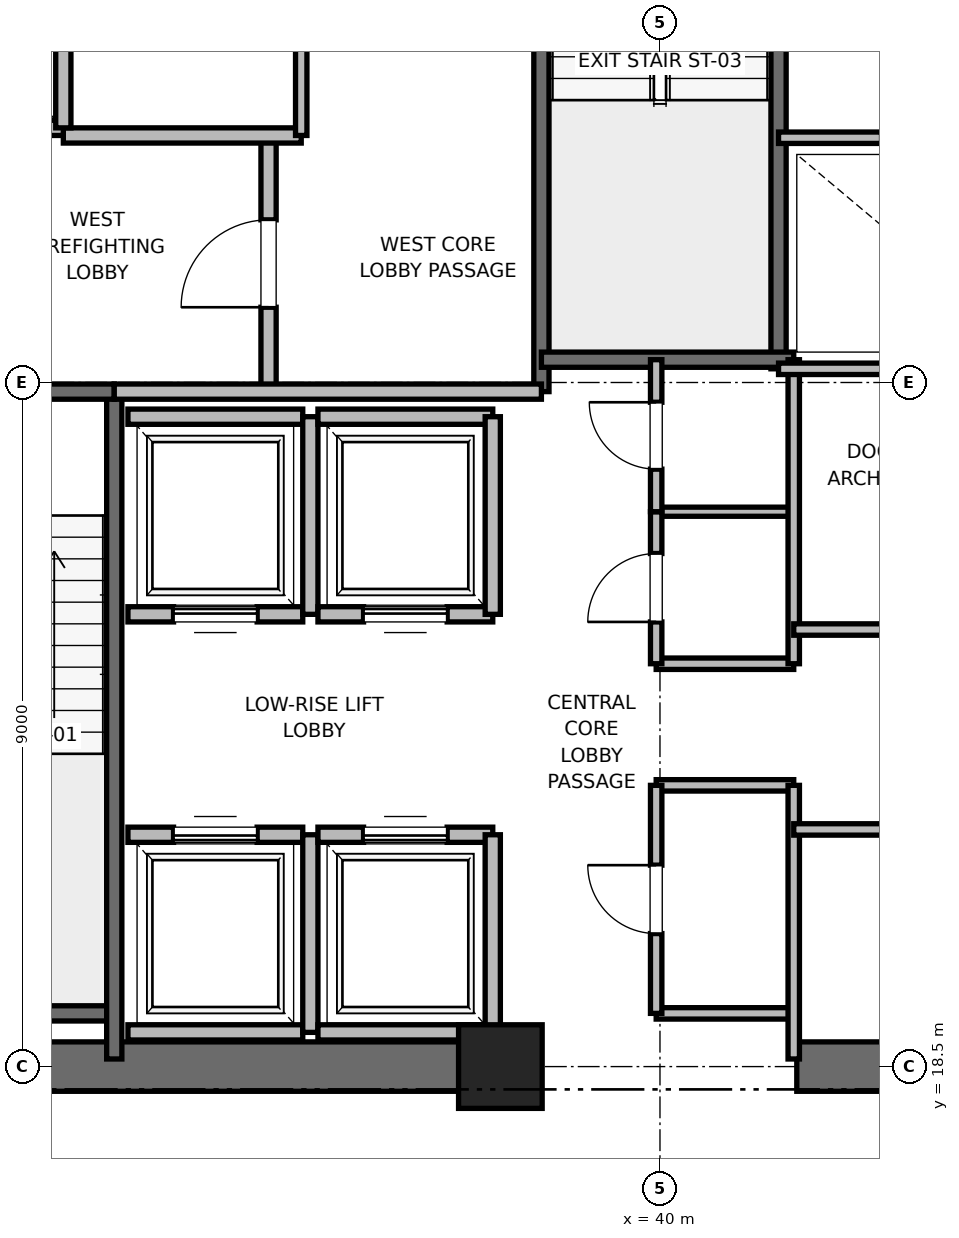
"""IFC4 building model, lengths in metres.
Left out: names, types, materials, properties, quantities, classifications, styles, units other than length and angle.
Written with IfcOpenShell. Run it as: python <this file> out.ifc"""

import sys

from ifc_helpers import new_model, si_unit, direction, frame, frame_2d, origin, origin_2d, place, context, subcontext, project, spatial, rectangle, extrude, element, fill, save


model = new_model("IFC4")
c1 = context("Model", 3, precision=1e-05, world=origin(), true_north=direction((0.0, 1.0)))
c2 = subcontext(c1, "Body", "Model", "MODEL_VIEW")
j1 = project(units=[si_unit("LENGTHUNIT", "METRE"), si_unit("PLANEANGLEUNIT", "RADIAN")], contexts=[c1])
p1 = place(None, origin())
s1 = spatial("IfcSite", under=j1, at=p1, CompositionType="ELEMENT")
p2 = place(p1, origin())
s2 = spatial("IfcBuilding", under=s1, at=p2, CompositionType="ELEMENT")
p3 = place(p2, frame((0.0, 0.0, 31.6)))
s3 = spatial("IfcBuildingStorey", under=s2, at=p3, CompositionType="ELEMENT", Elevation=31.6)
p4 = place(p3, frame((37.9, 18.5, 0.0), z_axis=(0.0, 0.0, 1.0), x_axis=(1.0, 0.0, 0.0)))
e1 = element("IfcColumn", 1, at=p4, inside=s3, PredefinedType="PILASTER", context=c2, shape_type="SweptSolid", body=[
    extrude(rectangle(XDim=1.1, YDim=1.1, at=origin_2d()), origin(), (0.0, 0.0, 1.0), 4.0),
])
for number, where, z_axis, x_axis in (
    (2, (29.0, 18.5, 0.0), (0.0, 0.0, 1.0), (1.0, 0.0, 0.0)),
    (3, (41.8, 18.5, 0.0), (0.0, 0.0, 1.0), (1.0, 0.0, 0.0)),
):
    element("IfcWall", number, at=place(p3, frame(where, z_axis=z_axis, x_axis=x_axis)), inside=s3, PredefinedType="SHEAR", context=c2, shape_type="SweptSolid", body=[
        extrude(rectangle(XDim=9.2, YDim=0.65, at=frame_2d((4.6, 0.0))), origin(), (0.0, 0.0, 1.0), 3.76),
    ])
p5 = place(p3, frame((29.7, 19.2, 0.0), z_axis=(0.0, 0.0, 1.0), x_axis=(1.0, 0.0, 0.0)))
e4 = element("IfcWall", 4, at=p5, inside=s3, PredefinedType="SOLIDWALL", context=c2, shape_type="SweptSolid", body=[
    extrude(rectangle(XDim=3.12, YDim=0.2, at=frame_2d((1.56, 0.0))), origin(), (0.0, 0.0, 1.0), 3.76),
])
p6 = place(p3, frame((32.82, 18.6, 0.0), z_axis=(0.0, 0.0, 1.0), x_axis=(0.0, 1.0, 0.0)))
e5 = element("IfcWall", 5, at=p6, inside=s3, PredefinedType="SOLIDWALL", context=c2, shape_type="SweptSolid", body=[
    extrude(rectangle(XDim=8.78, YDim=0.2, at=frame_2d((4.39, 0.0))), origin(), (0.0, 0.0, 1.0), 3.76),
])
p7 = place(p3, frame((29.7, 27.38, 0.0), z_axis=(0.0, 0.0, 1.0), x_axis=(1.0, 0.0, 0.0)))
e6 = element("IfcWall", 6, at=p7, inside=s3, PredefinedType="SOLIDWALL", context=c2, shape_type="SweptSolid", body=[
    extrude(rectangle(XDim=3.12, YDim=0.2, at=frame_2d((1.56, 0.0))), origin(), (0.0, 0.0, 1.0), 3.76),
])
p8 = place(p7, frame((1.01, 0.0, 0.0)))
e7 = element("IfcOpeningElement", 7, at=p8, cuts=e6, PredefinedType="OPENING", context=c2, shape_type="SweptSolid", body=[
    extrude(rectangle(XDim=1.1, YDim=2.15, at=frame_2d((0.55, 1.075))), frame((0.0, 0.1, 0.0), z_axis=(0.0, -1.0, 0.0), x_axis=(1.0, 0.0, 0.0)), (0.0, 0.0, 1.0), 0.2),
])
p9 = place(p3, frame((38.44, 27.38, 0.0), z_axis=(0.0, 0.0, 1.0), x_axis=(0.0, 1.0, 0.0)))
e8 = element("IfcWall", 8, at=p9, inside=s3, PredefinedType="SOLIDWALL", context=c2, shape_type="SweptSolid", body=[
    extrude(rectangle(XDim=8.87, YDim=0.2, at=frame_2d((4.435, 0.0))), origin(), (0.0, 0.0, 1.0), 3.76),
])
p10 = place(p3, frame((41.56, 27.68, 0.0), z_axis=(0.0, 0.0, 1.0), x_axis=(0.0, 1.0, 0.0)))
e9 = element("IfcWall", 9, at=p10, inside=s3, PredefinedType="SOLIDWALL", context=c2, shape_type="SweptSolid", body=[
    extrude(rectangle(XDim=8.57, YDim=0.2, at=frame_2d((4.285, 0.0))), origin(), (0.0, 0.0, 1.0), 3.76),
])
p11 = place(p3, frame((38.44, 27.8, 0.0), z_axis=(0.0, 0.0, 1.0), x_axis=(1.0, 0.0, 0.0)))
e10 = element("IfcWall", 10, at=p11, inside=s3, PredefinedType="SOLIDWALL", context=c2, shape_type="SweptSolid", body=[
    extrude(rectangle(XDim=3.32, YDim=0.2, at=frame_2d((1.66, 0.0))), origin(), (0.0, 0.0, 1.0), 3.76),
])
p12 = place(p3, frame((34.85, 27.38, 0.0), z_axis=(0.0, 0.0, 1.0), x_axis=(0.0, 1.0, 0.0)))
e11 = element("IfcWall", 11, at=p12, inside=s3, PredefinedType="PARTITIONING", context=c2, shape_type="SweptSolid", body=[
    extrude(rectangle(XDim=3.37, YDim=0.2, at=frame_2d((1.685, 0.0))), origin(), (0.0, 0.0, 1.0), 3.76),
])
p13 = place(p12, frame((1.11, 0.0, 0.0)))
e12 = element("IfcOpeningElement", 12, at=p13, cuts=e11, PredefinedType="OPENING", context=c2, shape_type="SweptSolid", body=[
    extrude(rectangle(XDim=1.15, YDim=2.2, at=frame_2d((0.575, 1.1))), frame((0.0, 0.1, 0.0), z_axis=(0.0, -1.0, 0.0), x_axis=(1.0, 0.0, 0.0)), (0.0, 0.0, 1.0), 0.2),
])
p14 = place(p3, frame((32.82, 27.38, 0.0), z_axis=(0.0, 0.0, 1.0), x_axis=(1.0, 0.0, 0.0)))
e13 = element("IfcWall", 13, at=p14, inside=s3, PredefinedType="PARTITIONING", context=c2, shape_type="SweptSolid", body=[
    extrude(rectangle(XDim=5.62, YDim=0.2, at=frame_2d((2.81, 0.0))), origin(), (0.0, 0.0, 1.0), 3.76),
])
p15 = place(p3, frame((32.15, 30.75, 0.0), z_axis=(0.0, 0.0, 1.0), x_axis=(1.0, 0.0, 0.0)))
e14 = element("IfcWall", 14, at=p15, inside=s3, PredefinedType="PARTITIONING", context=c2, shape_type="SweptSolid", body=[
    extrude(rectangle(XDim=3.13, YDim=0.2, at=frame_2d((1.565, 0.0))), origin(), (0.0, 0.0, 1.0), 3.76),
])
p16 = place(p3, frame((29.55, 30.85, 0.0), z_axis=(0.0, 0.0, 1.0), x_axis=(1.0, 0.0, 0.0)))
e15 = element("IfcWall", 15, at=p16, inside=s3, PredefinedType="SOLIDWALL", context=c2, shape_type="SweptSolid", body=[
    extrude(rectangle(XDim=2.6, YDim=0.2, at=frame_2d((1.3, 0.0))), origin(), (0.0, 0.0, 1.0), 2.54),
])
p17 = place(p16, frame((0.75, 0.0, 0.0)))
e16 = element("IfcOpeningElement", 16, at=p17, cuts=e15, PredefinedType="OPENING", context=c2, shape_type="SweptSolid", body=[
    extrude(rectangle(XDim=1.1, YDim=2.2, at=frame_2d((0.55, 1.1))), frame((0.0, 0.1, 0.0), z_axis=(0.0, -1.0, 0.0), x_axis=(1.0, 0.0, 0.0)), (0.0, 0.0, 1.0), 0.2),
])
p18 = place(p3, frame((32.15, 30.85, 0.0), z_axis=(0.0, 0.0, 1.0), x_axis=(0.0, 1.0, 0.0)))
e17 = element("IfcWall", 17, at=p18, inside=s3, PredefinedType="SOLIDWALL", context=c2, shape_type="SweptSolid", body=[
    extrude(rectangle(XDim=3.0, YDim=0.2, at=frame_2d((1.5, 0.0))), origin(), (0.0, 0.0, 1.0), 3.76),
])
p19 = place(p3, frame((33.0, 18.95, 0.0), z_axis=(0.0, 0.0, 1.0), x_axis=(1.0, 0.0, 0.0)))
e18 = element("IfcWall", 18, at=p19, inside=s3, PredefinedType="SOLIDWALL", context=c2, shape_type="SweptSolid", body=[
    extrude(rectangle(XDim=2.3, YDim=0.2, at=frame_2d((1.15, 0.0))), origin(), (0.0, 0.0, 1.0), 3.76),
])
p20 = place(p3, frame((35.3, 21.55, 0.0), z_axis=(0.0, 0.0, 1.0), x_axis=(-1.0, 0.0, 0.0)))
e19 = element("IfcWall", 19, at=p20, inside=s3, PredefinedType="SOLIDWALL", context=c2, shape_type="SweptSolid", body=[
    extrude(rectangle(XDim=2.3, YDim=0.2, at=frame_2d((1.15, 0.0))), origin(), (0.0, 0.0, 1.0), 3.76),
])
p21 = place(p20, frame((0.6, 0.0, 0.0)))
e20 = element("IfcOpeningElement", 20, at=p21, cuts=e19, PredefinedType="OPENING", context=c2, shape_type="SweptSolid", body=[
    extrude(rectangle(XDim=1.1, YDim=2.2, at=frame_2d((0.55, 1.1))), frame((0.0, 0.1, 0.0), z_axis=(0.0, -1.0, 0.0), x_axis=(1.0, 0.0, 0.0)), (0.0, 0.0, 1.0), 0.2),
])
p22 = place(p3, frame((35.4, 18.95, 0.0), z_axis=(0.0, 0.0, 1.0), x_axis=(0.0, 1.0, 0.0)))
e21 = element("IfcWall", 21, at=p22, inside=s3, PredefinedType="SOLIDWALL", context=c2, shape_type="SweptSolid", body=[
    extrude(rectangle(XDim=2.6, YDim=0.2, at=frame_2d((1.3, 0.0))), origin(), (0.0, 0.0, 1.0), 3.76),
])
p23 = place(p3, frame((35.5, 18.95, 0.0), z_axis=(0.0, 0.0, 1.0), x_axis=(1.0, 0.0, 0.0)))
e22 = element("IfcWall", 22, at=p23, inside=s3, PredefinedType="SOLIDWALL", context=c2, shape_type="SweptSolid", body=[
    extrude(rectangle(XDim=2.3, YDim=0.2, at=frame_2d((1.15, 0.0))), origin(), (0.0, 0.0, 1.0), 2.54),
])
p24 = place(p3, frame((37.8, 21.55, 0.0), z_axis=(0.0, 0.0, 1.0), x_axis=(-1.0, 0.0, 0.0)))
e23 = element("IfcWall", 23, at=p24, inside=s3, PredefinedType="SOLIDWALL", context=c2, shape_type="SweptSolid", body=[
    extrude(rectangle(XDim=2.3, YDim=0.2, at=frame_2d((1.15, 0.0))), origin(), (0.0, 0.0, 1.0), 3.76),
])
p25 = place(p24, frame((0.6, 0.0, 0.0)))
e24 = element("IfcOpeningElement", 24, at=p25, cuts=e23, PredefinedType="OPENING", context=c2, shape_type="SweptSolid", body=[
    extrude(rectangle(XDim=1.1, YDim=2.2, at=frame_2d((0.55, 1.1))), frame((0.0, 0.1, 0.0), z_axis=(0.0, -1.0, 0.0), x_axis=(1.0, 0.0, 0.0)), (0.0, 0.0, 1.0), 0.2),
])
p26 = place(p3, frame((37.8, 18.95, 0.0), z_axis=(0.0, 0.0, 1.0), x_axis=(0.0, 1.0, 0.0)))
e25 = element("IfcWall", 25, at=p26, inside=s3, PredefinedType="SOLIDWALL", context=c2, shape_type="SweptSolid", body=[
    extrude(rectangle(XDim=2.6, YDim=0.2, at=frame_2d((1.3, 0.0))), origin(), (0.0, 0.0, 1.0), 2.54),
])
p27 = place(p3, frame((33.0, 24.45, 0.0), z_axis=(0.0, 0.0, 1.0), x_axis=(1.0, 0.0, 0.0)))
e26 = element("IfcWall", 26, at=p27, inside=s3, PredefinedType="SOLIDWALL", context=c2, shape_type="SweptSolid", body=[
    extrude(rectangle(XDim=2.3, YDim=0.2, at=frame_2d((1.15, 0.0))), origin(), (0.0, 0.0, 1.0), 3.76),
])
p28 = place(p27, frame((0.6, 0.0, 0.0)))
e27 = element("IfcOpeningElement", 27, at=p28, cuts=e26, PredefinedType="OPENING", context=c2, shape_type="SweptSolid", body=[
    extrude(rectangle(XDim=1.1, YDim=2.2, at=frame_2d((0.55, 1.1))), frame((0.0, 0.1, 0.0), z_axis=(0.0, -1.0, 0.0), x_axis=(1.0, 0.0, 0.0)), (0.0, 0.0, 1.0), 0.2),
])
p29 = place(p3, frame((35.3, 27.05, 0.0), z_axis=(0.0, 0.0, 1.0), x_axis=(-1.0, 0.0, 0.0)))
e28 = element("IfcWall", 28, at=p29, inside=s3, PredefinedType="SOLIDWALL", context=c2, shape_type="SweptSolid", body=[
    extrude(rectangle(XDim=2.3, YDim=0.2, at=frame_2d((1.15, 0.0))), origin(), (0.0, 0.0, 1.0), 3.76),
])
p30 = place(p3, frame((35.4, 24.45, 0.0), z_axis=(0.0, 0.0, 1.0), x_axis=(0.0, 1.0, 0.0)))
e29 = element("IfcWall", 29, at=p30, inside=s3, PredefinedType="SOLIDWALL", context=c2, shape_type="SweptSolid", body=[
    extrude(rectangle(XDim=2.6, YDim=0.2, at=frame_2d((1.3, 0.0))), origin(), (0.0, 0.0, 1.0), 3.76),
])
p31 = place(p3, frame((35.5, 24.45, 0.0), z_axis=(0.0, 0.0, 1.0), x_axis=(1.0, 0.0, 0.0)))
e30 = element("IfcWall", 30, at=p31, inside=s3, PredefinedType="SOLIDWALL", context=c2, shape_type="SweptSolid", body=[
    extrude(rectangle(XDim=2.3, YDim=0.2, at=frame_2d((1.15, 0.0))), origin(), (0.0, 0.0, 1.0), 3.76),
])
p32 = place(p31, frame((0.6, 0.0, 0.0)))
e31 = element("IfcOpeningElement", 31, at=p32, cuts=e30, PredefinedType="OPENING", context=c2, shape_type="SweptSolid", body=[
    extrude(rectangle(XDim=1.1, YDim=2.2, at=frame_2d((0.55, 1.1))), frame((0.0, 0.1, 0.0), z_axis=(0.0, -1.0, 0.0), x_axis=(1.0, 0.0, 0.0)), (0.0, 0.0, 1.0), 0.2),
])
p33 = place(p3, frame((37.8, 27.05, 0.0), z_axis=(0.0, 0.0, 1.0), x_axis=(-1.0, 0.0, 0.0)))
e32 = element("IfcWall", 32, at=p33, inside=s3, PredefinedType="SOLIDWALL", context=c2, shape_type="SweptSolid", body=[
    extrude(rectangle(XDim=2.3, YDim=0.2, at=frame_2d((1.15, 0.0))), origin(), (0.0, 0.0, 1.0), 3.76),
])
p34 = place(p3, frame((37.8, 24.45, 0.0), z_axis=(0.0, 0.0, 1.0), x_axis=(0.0, 1.0, 0.0)))
e33 = element("IfcWall", 33, at=p34, inside=s3, PredefinedType="SOLIDWALL", context=c2, shape_type="SweptSolid", body=[
    extrude(rectangle(XDim=2.6, YDim=0.2, at=frame_2d((1.3, 0.0))), origin(), (0.0, 0.0, 1.0), 3.76),
])
for number, where, z_axis, x_axis in (
    (34, (39.95, 19.2, 0.0), (0.0, 0.0, 1.0), (1.0, 0.0, 0.0)),
    (35, (39.95, 22.2, 0.0), (0.0, 0.0, 1.0), (1.0, 0.0, 0.0)),
    (36, (39.95, 23.8, 0.0), (0.0, 0.0, 1.0), (1.0, 0.0, 0.0)),
):
    element("IfcWall", number, at=place(p3, frame(where, z_axis=z_axis, x_axis=x_axis)), inside=s3, PredefinedType="PARTITIONING", context=c2, shape_type="SweptSolid", body=[
        extrude(rectangle(XDim=1.81, YDim=0.15, at=frame_2d((0.905, 0.0))), origin(), (0.0, 0.0, 1.0), 2.85),
    ])
p35 = place(p3, frame((39.95, 25.8, 0.0), z_axis=(0.0, 0.0, 1.0), x_axis=(1.0, 0.0, 0.0)))
e37 = element("IfcWall", 37, at=p35, inside=s3, PredefinedType="PARTITIONING", context=c2, shape_type="SweptSolid", body=[
    extrude(rectangle(XDim=1.81, YDim=0.12, at=frame_2d((0.905, 0.0))), origin(), (0.0, 0.0, 1.0), 2.85),
])
p36 = place(p3, frame((41.76, 18.6, 0.0), z_axis=(0.0, 0.0, 1.0), x_axis=(0.0, 1.0, 0.0)))
e38 = element("IfcWall", 38, at=p36, inside=s3, PredefinedType="PARTITIONING", context=c2, shape_type="SweptSolid", body=[
    extrude(rectangle(XDim=3.6, YDim=0.15, at=frame_2d((1.8, 0.0))), origin(), (0.0, 0.0, 1.0), 2.54),
])
p37 = place(p3, frame((41.76, 23.8, 0.0), z_axis=(0.0, 0.0, 1.0), x_axis=(0.0, 1.0, 0.0)))
e39 = element("IfcWall", 39, at=p37, inside=s3, PredefinedType="PARTITIONING", context=c2, shape_type="SweptSolid", body=[
    extrude(rectangle(XDim=4.0, YDim=0.15, at=frame_2d((2.0, 0.0))), origin(), (0.0, 0.0, 1.0), 2.85),
])
p38 = place(p3, frame((39.95, 19.2, 0.0), z_axis=(0.0, 0.0, 1.0), x_axis=(0.0, 1.0, 0.0)))
e40 = element("IfcWall", 40, at=p38, inside=s3, PredefinedType="PARTITIONING", context=c2, shape_type="SweptSolid", body=[
    extrude(rectangle(XDim=3.0, YDim=0.15, at=frame_2d((1.5, 0.0))), origin(), (0.0, 0.0, 1.0), 2.85),
])
p39 = place(p38, frame((1.05, 0.0, 0.0)))
e41 = element("IfcOpeningElement", 41, at=p39, cuts=e40, PredefinedType="OPENING", context=c2, shape_type="SweptSolid", body=[
    extrude(rectangle(XDim=0.9, YDim=2.1, at=frame_2d((0.45, 1.05))), frame((0.0, 0.075, 0.0), z_axis=(0.0, -1.0, 0.0), x_axis=(1.0, 0.0, 0.0)), (0.0, 0.0, 1.0), 0.15),
])
p40 = place(p3, frame((39.95, 23.8, 0.0), z_axis=(0.0, 0.0, 1.0), x_axis=(0.0, 1.0, 0.0)))
e42 = element("IfcWall", 42, at=p40, inside=s3, PredefinedType="PARTITIONING", context=c2, shape_type="SweptSolid", body=[
    extrude(rectangle(XDim=2.0, YDim=0.15, at=frame_2d((1.0, 0.0))), origin(), (0.0, 0.0, 1.0), 2.85),
])
p41 = place(p40, frame((0.55, 0.0, 0.0)))
e43 = element("IfcOpeningElement", 43, at=p41, cuts=e42, PredefinedType="OPENING", context=c2, shape_type="SweptSolid", body=[
    extrude(rectangle(XDim=0.9, YDim=2.1, at=frame_2d((0.45, 1.05))), frame((0.0, 0.075, 0.0), z_axis=(0.0, -1.0, 0.0), x_axis=(1.0, 0.0, 0.0)), (0.0, 0.0, 1.0), 0.15),
])
p42 = place(p3, frame((39.95, 25.8, 0.0), z_axis=(0.0, 0.0, 1.0), x_axis=(0.0, 1.0, 0.0)))
e44 = element("IfcWall", 44, at=p42, inside=s3, PredefinedType="PARTITIONING", context=c2, shape_type="SweptSolid", body=[
    extrude(rectangle(XDim=2.0, YDim=0.15, at=frame_2d((1.0, 0.0))), origin(), (0.0, 0.0, 1.0), 2.85),
])
p43 = place(p42, frame((0.56, 0.0, 0.0)))
e45 = element("IfcOpeningElement", 45, at=p43, cuts=e44, PredefinedType="OPENING", context=c2, shape_type="SweptSolid", body=[
    extrude(rectangle(XDim=0.88, YDim=2.1, at=frame_2d((0.44, 1.05))), frame((0.0, 0.075, 0.0), z_axis=(0.0, -1.0, 0.0), x_axis=(1.0, 0.0, 0.0)), (0.0, 0.0, 1.0), 0.15),
])
p44 = place(p3, frame((35.28, 30.75, 0.0), z_axis=(0.0, 0.0, 1.0), x_axis=(0.0, 1.0, 0.0)))
e46 = element("IfcWall", 46, at=p44, inside=s3, PredefinedType="PARTITIONING", context=c2, shape_type="SweptSolid", body=[
    extrude(rectangle(XDim=3.2, YDim=0.15, at=frame_2d((1.6, 0.0))), origin(), (0.0, 0.0, 1.0), 2.85),
])
p45 = place(p44, frame((1.15, 0.0, 0.0)))
e47 = element("IfcOpeningElement", 47, at=p45, cuts=e46, PredefinedType="OPENING", context=c2, shape_type="SweptSolid", body=[
    extrude(rectangle(XDim=0.9, YDim=2.1, at=frame_2d((0.45, 1.05))), frame((0.0, 0.075, 0.0), z_axis=(0.0, -1.0, 0.0), x_axis=(1.0, 0.0, 0.0)), (0.0, 0.0, 1.0), 0.15),
])
p46 = place(p3, frame((41.56, 27.68, 0.0), z_axis=(0.0, 0.0, 1.0), x_axis=(1.0, 0.0, 0.0)))
e48 = element("IfcWall", 48, at=p46, inside=s3, PredefinedType="PARTITIONING", context=c2, shape_type="SweptSolid", body=[
    extrude(rectangle(XDim=3.59, YDim=0.15, at=frame_2d((1.795, 0.0))), origin(), (0.0, 0.0, 1.0), 2.85),
])
p47 = place(p3, frame((41.76, 21.62, 0.0), z_axis=(0.0, 0.0, 1.0), x_axis=(1.0, 0.0, 0.0)))
e49 = element("IfcWall", 49, at=p47, inside=s3, PredefinedType="PARTITIONING", context=c2, shape_type="SweptSolid", body=[
    extrude(rectangle(XDim=5.98, YDim=0.15, at=frame_2d((2.99, 0.0))), origin(), (0.0, 0.0, 1.0), 2.85),
])
p48 = place(p47, frame((2.49, 0.0, 0.0)))
e50 = element("IfcOpeningElement", 50, at=p48, cuts=e49, PredefinedType="OPENING", context=c2, shape_type="SweptSolid", body=[
    extrude(rectangle(XDim=1.0, YDim=2.15, at=frame_2d((0.5, 1.075))), frame((0.0, 0.075, 0.0), z_axis=(0.0, -1.0, 0.0), x_axis=(1.0, 0.0, 0.0)), (0.0, 0.0, 1.0), 0.15),
])
p49 = place(p3, frame((41.76, 24.25, 0.0), z_axis=(0.0, 0.0, 1.0), x_axis=(1.0, 0.0, 0.0)))
e51 = element("IfcWall", 51, at=p49, inside=s3, PredefinedType="PARTITIONING", context=c2, shape_type="SweptSolid", body=[
    extrude(rectangle(XDim=3.39, YDim=0.15, at=frame_2d((1.695, 0.0))), origin(), (0.0, 0.0, 1.0), 2.85),
])
p50 = place(p49, frame((1.195, 0.0, 0.0)))
e52 = element("IfcOpeningElement", 52, at=p50, cuts=e51, PredefinedType="OPENING", context=c2, shape_type="SweptSolid", body=[
    extrude(rectangle(XDim=1.0, YDim=2.15, at=frame_2d((0.5, 1.075))), frame((0.0, 0.075, 0.0), z_axis=(0.0, -1.0, 0.0), x_axis=(1.0, 0.0, 0.0)), (0.0, 0.0, 1.0), 0.15),
])
p51 = place(p3, frame((41.56, 30.72, 0.0), z_axis=(0.0, 0.0, 1.0), x_axis=(1.0, 0.0, 0.0)))
e53 = element("IfcWall", 53, at=p51, inside=s3, PredefinedType="PARTITIONING", context=c2, shape_type="SweptSolid", body=[
    extrude(rectangle(XDim=3.59, YDim=0.15, at=frame_2d((1.795, 0.0))), origin(), (0.0, 0.0, 1.0), 2.85),
])
p52 = place(p51, frame((1.355, 0.0, 0.0)))
e54 = element("IfcOpeningElement", 54, at=p52, cuts=e53, PredefinedType="OPENING", context=c2, shape_type="SweptSolid", body=[
    extrude(rectangle(XDim=0.88, YDim=2.1, at=frame_2d((0.44, 1.05))), frame((0.0, 0.075, 0.0), z_axis=(0.0, -1.0, 0.0), x_axis=(1.0, 0.0, 0.0)), (0.0, 0.0, 1.0), 0.15),
])
p53 = place(p13, origin())
e55 = element("IfcDoor", 55, at=p53, inside=s3, OperationType="SINGLE_SWING_LEFT", PredefinedType="DOOR", context=c2, shape_type="SweptSolid", body=[
    extrude(rectangle(XDim=1.15, YDim=2.2, at=frame_2d((0.575, 1.1))), frame((0.0, 0.025, 0.0), z_axis=(0.0, -1.0, 0.0), x_axis=(1.0, 0.0, 0.0)), (0.0, 0.0, 1.0), 0.05),
])
fill(e12, e55)
p54 = place(p21, origin())
e56 = element("IfcDoor", 56, at=p54, inside=s3, OperationType="SLIDING_TO_RIGHT", PredefinedType="DOOR", context=c2, shape_type="SweptSolid", body=[
    extrude(rectangle(XDim=1.1, YDim=2.2, at=frame_2d((0.55, 1.1))), frame((0.0, 0.025, 0.0), z_axis=(0.0, -1.0, 0.0), x_axis=(1.0, 0.0, 0.0)), (0.0, 0.0, 1.0), 0.05),
])
fill(e20, e56)
p55 = place(p25, origin())
e57 = element("IfcDoor", 57, at=p55, inside=s3, OperationType="SLIDING_TO_RIGHT", PredefinedType="DOOR", context=c2, shape_type="SweptSolid", body=[
    extrude(rectangle(XDim=1.1, YDim=2.2, at=frame_2d((0.55, 1.1))), frame((0.0, 0.025, 0.0), z_axis=(0.0, -1.0, 0.0), x_axis=(1.0, 0.0, 0.0)), (0.0, 0.0, 1.0), 0.05),
])
fill(e24, e57)
p56 = place(p28, origin())
e58 = element("IfcDoor", 58, at=p56, inside=s3, OperationType="SLIDING_TO_RIGHT", PredefinedType="DOOR", context=c2, shape_type="SweptSolid", body=[
    extrude(rectangle(XDim=1.1, YDim=2.2, at=frame_2d((0.55, 1.1))), frame((0.0, 0.025, 0.0), z_axis=(0.0, -1.0, 0.0), x_axis=(1.0, 0.0, 0.0)), (0.0, 0.0, 1.0), 0.05),
])
fill(e27, e58)
p57 = place(p32, origin())
e59 = element("IfcDoor", 59, at=p57, inside=s3, OperationType="SLIDING_TO_RIGHT", PredefinedType="DOOR", context=c2, shape_type="SweptSolid", body=[
    extrude(rectangle(XDim=1.1, YDim=2.2, at=frame_2d((0.55, 1.1))), frame((0.0, 0.025, 0.0), z_axis=(0.0, -1.0, 0.0), x_axis=(1.0, 0.0, 0.0)), (0.0, 0.0, 1.0), 0.05),
])
fill(e31, e59)
p58 = place(p39, origin())
e60 = element("IfcDoor", 60, at=p58, inside=s3, OperationType="SINGLE_SWING_RIGHT", PredefinedType="DOOR", context=c2, shape_type="SweptSolid", body=[
    extrude(rectangle(XDim=0.9, YDim=2.1, at=frame_2d((0.45, 1.05))), frame((0.0, 0.025, 0.0), z_axis=(0.0, -1.0, 0.0), x_axis=(1.0, 0.0, 0.0)), (0.0, 0.0, 1.0), 0.05),
])
fill(e41, e60)
p59 = place(p41, origin())
e61 = element("IfcDoor", 61, at=p59, inside=s3, OperationType="SINGLE_SWING_LEFT", PredefinedType="DOOR", context=c2, shape_type="SweptSolid", body=[
    extrude(rectangle(XDim=0.9, YDim=2.1, at=frame_2d((0.45, 1.05))), frame((0.0, 0.025, 0.0), z_axis=(0.0, -1.0, 0.0), x_axis=(1.0, 0.0, 0.0)), (0.0, 0.0, 1.0), 0.05),
])
fill(e43, e61)
p60 = place(p43, origin())
e62 = element("IfcDoor", 62, at=p60, inside=s3, OperationType="SINGLE_SWING_RIGHT", PredefinedType="DOOR", context=c2, shape_type="SweptSolid", body=[
    extrude(rectangle(XDim=0.88, YDim=2.1, at=frame_2d((0.44, 1.05))), frame((0.0, 0.025, 0.0), z_axis=(0.0, -1.0, 0.0), x_axis=(1.0, 0.0, 0.0)), (0.0, 0.0, 1.0), 0.05),
])
fill(e45, e62)
save(model, sys.argv[1])
